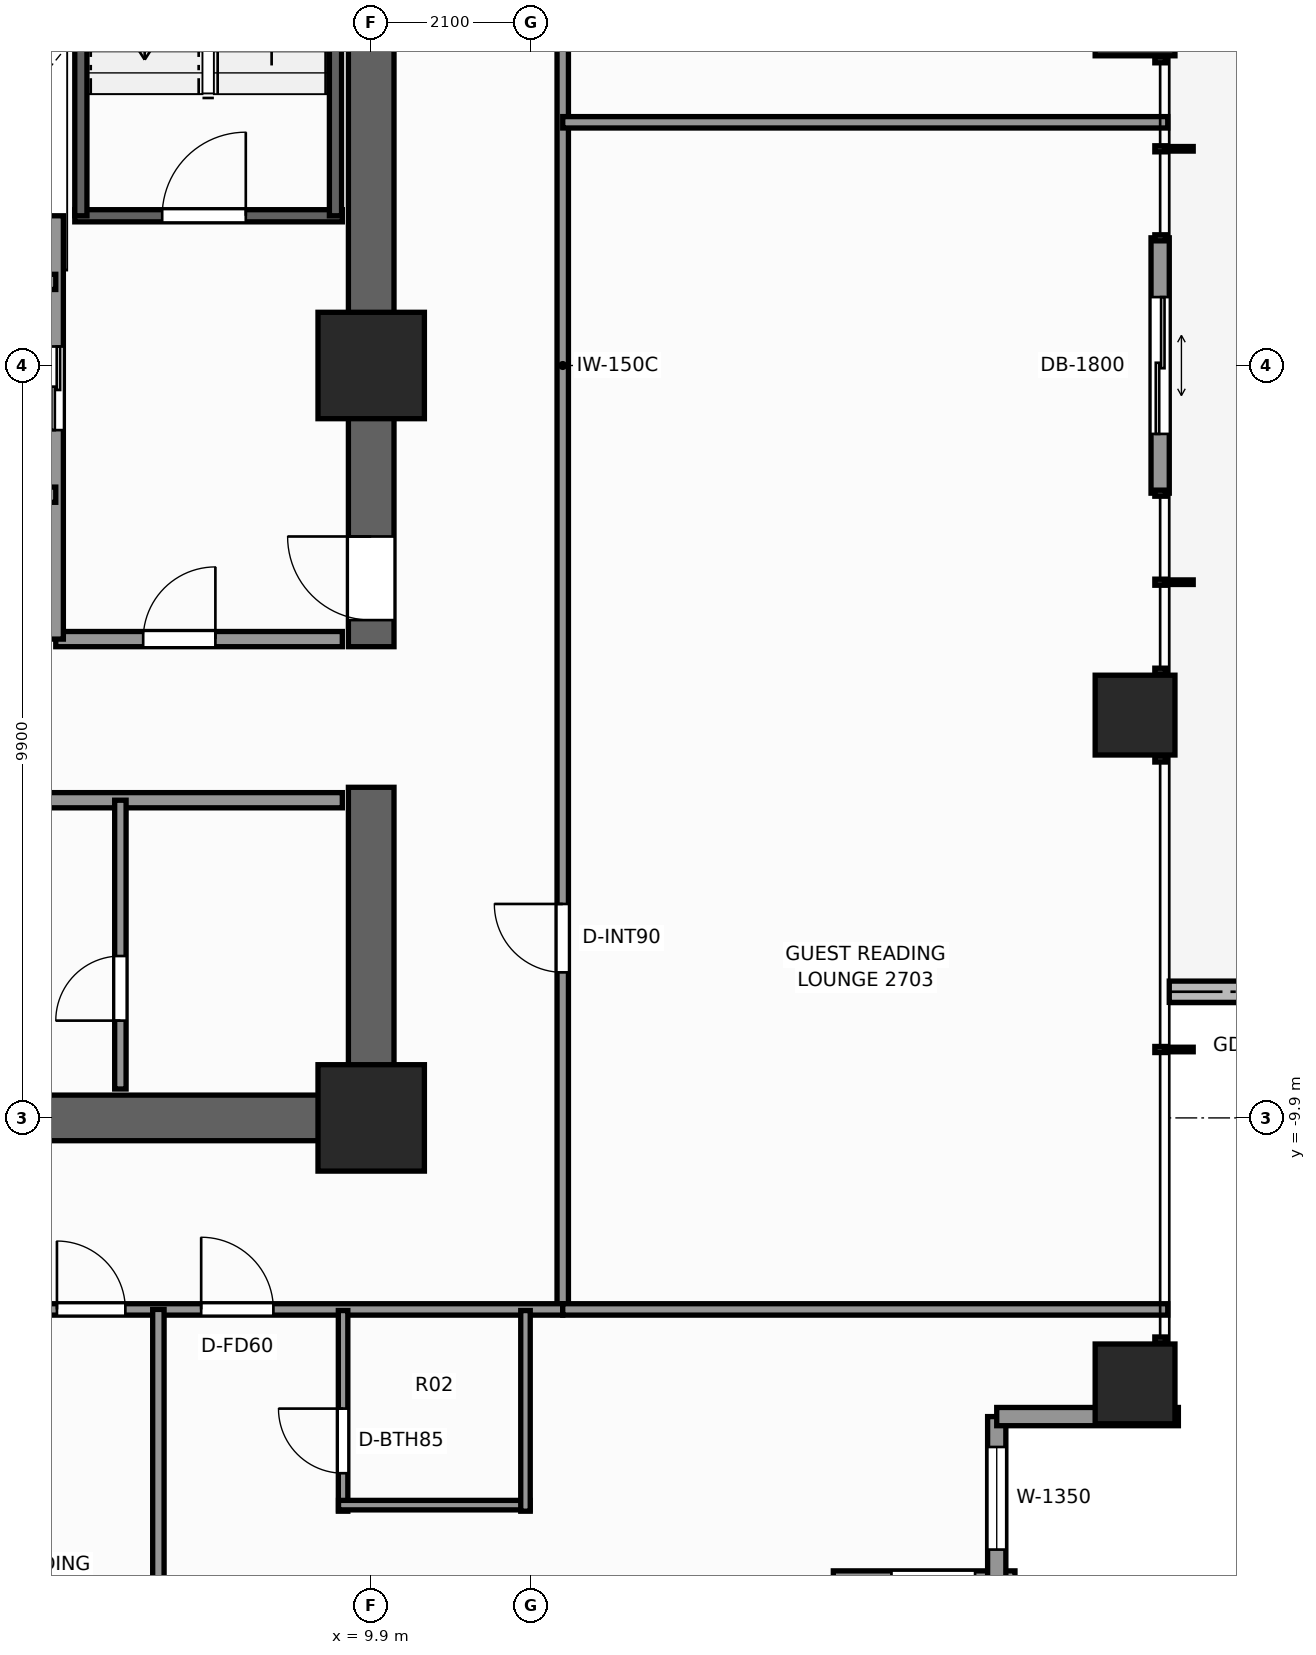
"""IFC4 building model, lengths in metres.
Left out: names, types, materials, properties, quantities, classifications, styles, units other than length and angle.
Written with IfcOpenShell. Run it as: python <this file> out.ifc"""

import sys

from ifc_helpers import new_model, si_unit, direction, frame, frame_2d, origin, origin_2d, place, context, subcontext, project, spatial, rectangle, extrude, element, fill, save


model = new_model("IFC4")
c1 = context("Model", 3, precision=1e-05, world=origin(), true_north=direction((0.0, 1.0)))
c2 = subcontext(c1, "Body", "Model", "MODEL_VIEW")
j1 = project(units=[si_unit("LENGTHUNIT", "METRE"), si_unit("PLANEANGLEUNIT", "RADIAN")], contexts=[c1])
p1 = place(None, origin())
s1 = spatial("IfcSite", under=j1, at=p1, CompositionType="ELEMENT")
p2 = place(p1, origin())
s2 = spatial("IfcBuilding", under=s1, at=p2, CompositionType="ELEMENT")
p3 = place(p2, frame((0.0, 0.0, 95.3)))
s3 = spatial("IfcBuildingStorey", under=s2, at=p3, CompositionType="ELEMENT", Elevation=95.3)
p4 = place(p3, frame((10.2, -9.9, 0.0), z_axis=(0.0, 0.0, 1.0), x_axis=(-1.0, 0.0, 0.0)))
e1 = element("IfcWall", 1, at=p4, inside=s3, PredefinedType="SHEAR", context=c2, shape_type="SweptSolid", body=[
    extrude(rectangle(XDim=12.06, YDim=0.6, at=frame_2d((6.03, 0.0))), origin(), (0.0, 0.0, 1.0), 3.3),
])
p5 = place(p3, frame((9.9, -9.6, 0.0), z_axis=(0.0, 0.0, 1.0), x_axis=(0.0, 1.0, 0.0)))
e2 = element("IfcWall", 2, at=p5, inside=s3, PredefinedType="SHEAR", context=c2, shape_type="SweptSolid", body=[
    extrude(rectangle(XDim=4.05, YDim=0.6, at=frame_2d((2.025, 0.0))), origin(), (0.0, 0.0, 1.0), 3.3),
])
p6 = place(p3, frame((9.9, -3.7, 0.0), z_axis=(0.0, 0.0, 1.0), x_axis=(0.0, 1.0, 0.0)))
e3 = element("IfcWall", 3, at=p6, inside=s3, PredefinedType="SHEAR", context=c2, shape_type="SweptSolid", body=[
    extrude(rectangle(XDim=13.3, YDim=0.6, at=frame_2d((6.65, 0.0))), origin(), (0.0, 0.0, 1.0), 3.3),
])
p7 = place(p6, frame((0.35, 0.0, 0.0)))
e4 = element("IfcOpeningElement", 4, at=p7, cuts=e3, PredefinedType="OPENING", context=c2, shape_type="SweptSolid", body=[
    extrude(rectangle(XDim=1.1, YDim=2.2, at=frame_2d((0.55, 1.1))), frame((0.0, 0.31, 0.0), z_axis=(0.0, -1.0, 0.0), x_axis=(1.0, 0.0, 0.0)), (0.0, 0.0, 1.0), 0.62),
])
for number, where, z_axis, x_axis in (
    (5, (9.9, -9.9, 0.0), (0.0, 0.0, 1.0), (1.0, 0.0, 0.0)),
    (6, (9.9, 0.0, 0.0), (0.0, 0.0, 1.0), (1.0, 0.0, 0.0)),
):
    element("IfcColumn", number, at=place(p3, frame(where, z_axis=z_axis, x_axis=x_axis)), inside=s3, PredefinedType="COLUMN", context=c2, shape_type="SweptSolid", body=[
        extrude(rectangle(XDim=1.4, YDim=1.4, at=origin_2d()), origin(), (0.0, 0.0, 1.0), 3.3),
    ])
for number, where, z_axis, x_axis in (
    (7, (19.95, -13.4, 0.0), (0.0, 0.0, 1.0), (1.0, 0.0, 0.0)),
    (8, (19.95, -4.6, 0.0), (0.0, 0.0, 1.0), (1.0, 0.0, 0.0)),
    (9, (19.95, 4.6, 0.0), (0.0, 0.0, 1.0), (1.0, 0.0, 0.0)),
):
    element("IfcColumn", number, at=place(p3, frame(where, z_axis=z_axis, x_axis=x_axis)), inside=s3, PredefinedType="COLUMN", context=c2, shape_type="SweptSolid", body=[
        extrude(rectangle(XDim=1.05, YDim=1.05, at=origin_2d()), origin(), (0.0, 0.0, 1.0), 3.3),
    ])
p8 = place(p3, frame((20.4, -8.24, -0.04), z_axis=(0.0, 0.0, 1.0), x_axis=(1.0, 0.0, 0.0)))
e10 = element("IfcWall", 10, at=p8, inside=s3, PredefinedType="PARAPET", context=c2, shape_type="SweptSolid", body=[
    extrude(rectangle(XDim=2.34, YDim=0.28, at=frame_2d((1.17, 0.0))), origin(), (0.0, 0.0, 1.0), 0.42),
])
p9 = place(p3, frame((18.37, -15.98, 0.0), z_axis=(0.0, 0.0, 1.0), x_axis=(-1.0, 0.0, 0.0)))
e11 = element("IfcWall", 11, at=p9, inside=s3, PredefinedType="STANDARD", context=c2, shape_type="SweptSolid", body=[
    extrude(rectangle(XDim=2.39, YDim=0.24, at=frame_2d((1.195, 0.0))), origin(), (0.0, 0.0, 1.0), 2.459),
])
p10 = place(p9, frame((0.525, 0.0, 0.65)))
e12 = element("IfcOpeningElement", 12, at=p10, cuts=e11, PredefinedType="OPENING", context=c2, shape_type="SweptSolid", body=[
    extrude(rectangle(XDim=1.1, YDim=1.45, at=frame_2d((0.55, 0.725))), frame((0.0, 0.13, 0.0), z_axis=(0.0, -1.0, 0.0), x_axis=(1.0, 0.0, 0.0)), (0.0, 0.0, 1.0), 0.26),
])
p11 = place(p3, frame((18.13, -13.83, 0.0), z_axis=(0.0, 0.0, 1.0), x_axis=(0.0, -1.0, 0.0)))
e13 = element("IfcWall", 13, at=p11, inside=s3, PredefinedType="STANDARD", context=c2, shape_type="SweptSolid", body=[
    extrude(rectangle(XDim=2.39, YDim=0.24, at=frame_2d((1.195, 0.0))), origin(), (0.0, 0.0, 1.0), 2.459),
])
p12 = place(p11, frame((0.4, 0.0, 0.65)))
e14 = element("IfcOpeningElement", 14, at=p12, cuts=e13, PredefinedType="OPENING", context=c2, shape_type="SweptSolid", body=[
    extrude(rectangle(XDim=1.35, YDim=1.55, at=frame_2d((0.675, 0.775))), frame((0.0, 0.13, 0.0), z_axis=(0.0, -1.0, 0.0), x_axis=(1.0, 0.0, 0.0)), (0.0, 0.0, 1.0), 0.26),
])
p13 = place(p3, frame((20.52, -13.83, 0.0), z_axis=(0.0, 0.0, 1.0), x_axis=(-1.0, 0.0, 0.0)))
e15 = element("IfcWall", 15, at=p13, inside=s3, PredefinedType="STANDARD", context=c2, shape_type="SweptSolid", body=[
    extrude(rectangle(XDim=2.39, YDim=0.24, at=frame_2d((1.195, 0.0))), origin(), (0.0, 0.0, 1.0), 2.459),
])
p14 = place(p3, frame((20.28, 1.68, 0.0), z_axis=(0.0, 0.0, 1.0), x_axis=(0.0, -1.0, 0.0)))
e16 = element("IfcWall", 16, at=p14, inside=s3, PredefinedType="STANDARD", context=c2, shape_type="SweptSolid", body=[
    extrude(rectangle(XDim=3.36, YDim=0.24, at=frame_2d((1.68, 0.0))), origin(), (0.0, 0.0, 1.0), 3.08),
])
p15 = place(p14, frame((0.78, 0.0, 0.0)))
e17 = element("IfcOpeningElement", 17, at=p15, cuts=e16, PredefinedType="OPENING", context=c2, shape_type="SweptSolid", body=[
    extrude(rectangle(XDim=1.8, YDim=2.2, at=frame_2d((0.9, 1.1))), frame((0.0, 0.13, 0.0), z_axis=(0.0, -1.0, 0.0), x_axis=(1.0, 0.0, 0.0)), (0.0, 0.0, 1.0), 0.26),
])
p16 = place(p3, frame((6.0, 1.97, 0.0), z_axis=(0.0, 0.0, 1.0), x_axis=(1.0, 0.0, 0.0)))
e18 = element("IfcWall", 18, at=p16, inside=s3, PredefinedType="SHEAR", context=c2, shape_type="SweptSolid", body=[
    extrude(rectangle(XDim=3.52, YDim=0.16, at=frame_2d((1.76, 0.0))), origin(), (0.0, 0.0, 1.0), 3.3),
])
p17 = place(p16, frame((1.15, 0.0, 0.0)))
e19 = element("IfcOpeningElement", 19, at=p17, cuts=e18, PredefinedType="OPENING", context=c2, shape_type="SweptSolid", body=[
    extrude(rectangle(XDim=1.1, YDim=2.2, at=frame_2d((0.55, 1.1))), frame((0.0, 0.09, 0.0), z_axis=(0.0, -1.0, 0.0), x_axis=(1.0, 0.0, 0.0)), (0.0, 0.0, 1.0), 0.18),
])
for number, where, z_axis, x_axis in (
    (20, (6.08, 1.97, 0.0), (0.0, 0.0, 1.0), (0.0, 1.0, 0.0)),
    (21, (9.43, 1.97, 0.0), (0.0, 0.0, 1.0), (0.0, 1.0, 0.0)),
):
    element("IfcWall", number, at=place(p3, frame(where, z_axis=z_axis, x_axis=x_axis)), inside=s3, PredefinedType="SHEAR", context=c2, shape_type="SweptSolid", body=[
        extrude(rectangle(XDim=7.56, YDim=0.16, at=frame_2d((3.78, 0.0))), origin(), (0.0, 0.0, 1.0), 3.3),
    ])
p18 = place(p3, frame((5.75, -3.6, 0.0), z_axis=(0.0, 0.0, 1.0), x_axis=(1.0, 0.0, 0.0)))
e22 = element("IfcWall", 22, at=p18, inside=s3, PredefinedType="SOLIDWALL", context=c2, shape_type="SweptSolid", body=[
    extrude(rectangle(XDim=3.77, YDim=0.2, at=frame_2d((1.885, 0.0))), origin(), (0.0, 0.0, 1.0), 3.08),
])
p19 = place(p18, frame((1.15, 0.0, 0.0)))
e23 = element("IfcOpeningElement", 23, at=p19, cuts=e22, PredefinedType="OPENING", context=c2, shape_type="SweptSolid", body=[
    extrude(rectangle(XDim=0.95, YDim=2.06, at=frame_2d((0.475, 1.03))), frame((0.0, 0.11, 0.0), z_axis=(0.0, -1.0, 0.0), x_axis=(1.0, 0.0, 0.0)), (0.0, 0.0, 1.0), 0.22),
])
p20 = place(p3, frame((5.75, -3.6, 0.0), z_axis=(0.0, 0.0, 1.0), x_axis=(0.0, 1.0, 0.0)))
e24 = element("IfcWall", 24, at=p20, inside=s3, PredefinedType="SOLIDWALL", context=c2, shape_type="SweptSolid", body=[
    extrude(rectangle(XDim=5.57, YDim=0.2, at=frame_2d((2.785, 0.0))), origin(), (0.0, 0.0, 1.0), 3.08),
])
p21 = place(p20, frame((2.75, 0.0, 0.0)))
e25 = element("IfcOpeningElement", 25, at=p21, cuts=e24, PredefinedType="OPENING", context=c2, shape_type="SweptSolid", body=[
    extrude(rectangle(XDim=1.1, YDim=2.2, at=frame_2d((0.55, 1.1))), frame((0.0, 0.11, 0.0), z_axis=(0.0, -1.0, 0.0), x_axis=(1.0, 0.0, 0.0)), (0.0, 0.0, 1.0), 0.22),
])
for number, where, z_axis, x_axis in (
    (26, (3.35, -1.7, 0.0), (0.0, 0.0, 1.0), (1.0, 0.0, 0.0)),
    (27, (3.35, 1.1, 0.0), (0.0, 0.0, 1.0), (1.0, 0.0, 0.0)),
):
    element("IfcWall", number, at=place(p3, frame(where, z_axis=z_axis, x_axis=x_axis)), inside=s3, PredefinedType="SOLIDWALL", context=c2, shape_type="SweptSolid", body=[
        extrude(rectangle(XDim=2.4, YDim=0.2, at=frame_2d((1.2, 0.0))), origin(), (0.0, 0.0, 1.0), 3.08),
    ])
p22 = place(p3, frame((3.86, -5.72, 0.0), z_axis=(0.0, 0.0, 1.0), x_axis=(1.0, 0.0, 0.0)))
e28 = element("IfcWall", 28, at=p22, inside=s3, PredefinedType="SOLIDWALL", context=c2, shape_type="SweptSolid", body=[
    extrude(rectangle(XDim=5.66, YDim=0.2, at=frame_2d((2.83, 0.0))), origin(), (0.0, 0.0, 1.0), 3.08),
])
p23 = place(p22, frame((0.85, 0.0, 0.0)))
e29 = element("IfcOpeningElement", 29, at=p23, cuts=e28, PredefinedType="OPENING", context=c2, shape_type="SweptSolid", body=[
    extrude(rectangle(XDim=0.95, YDim=2.06, at=frame_2d((0.475, 1.03))), frame((0.0, 0.11, 0.0), z_axis=(0.0, -1.0, 0.0), x_axis=(1.0, 0.0, 0.0)), (0.0, 0.0, 1.0), 0.22),
])
p24 = place(p3, frame((6.6, -9.52, 0.0), z_axis=(0.0, 0.0, 1.0), x_axis=(0.0, 1.0, 0.0)))
e30 = element("IfcWall", 30, at=p24, inside=s3, PredefinedType="PARTITIONING", context=c2, shape_type="SweptSolid", body=[
    extrude(rectangle(XDim=3.8, YDim=0.15, at=frame_2d((1.9, 0.0))), origin(), (0.0, 0.0, 1.0), 3.08),
])
p25 = place(p24, frame((0.9, 0.0, 0.0)))
e31 = element("IfcOpeningElement", 31, at=p25, cuts=e30, PredefinedType="OPENING", context=c2, shape_type="SweptSolid", body=[
    extrude(rectangle(XDim=0.85, YDim=2.03, at=frame_2d((0.425, 1.015))), frame((0.0, 0.085, 0.0), z_axis=(0.0, -1.0, 0.0), x_axis=(1.0, 0.0, 0.0)), (0.0, 0.0, 1.0), 0.17),
])
p26 = place(p3, frame((12.42, -12.42, 0.0), z_axis=(0.0, 0.0, 1.0), x_axis=(0.0, 1.0, 0.0)))
e32 = element("IfcWall", 32, at=p26, inside=s3, PredefinedType="PARTITIONING", context=c2, shape_type="SweptSolid", body=[
    extrude(rectangle(XDim=24.84, YDim=0.15, at=frame_2d((12.42, 0.0))), origin(), (0.0, 0.0, 1.0), 2.292),
])
p27 = place(p26, frame((4.435, 0.0, 0.0)))
e33 = element("IfcOpeningElement", 33, at=p27, cuts=e32, PredefinedType="OPENING", context=c2, shape_type="SweptSolid", body=[
    extrude(rectangle(XDim=0.9, YDim=2.06, at=frame_2d((0.45, 1.03))), frame((0.0, 0.085, 0.0), z_axis=(0.0, -1.0, 0.0), x_axis=(1.0, 0.0, 0.0)), (0.0, 0.0, 1.0), 0.17),
])
p28 = place(p26, frame((19.505, 0.0, 0.0)))
e34 = element("IfcOpeningElement", 34, at=p28, cuts=e32, PredefinedType="OPENING", context=c2, shape_type="SweptSolid", body=[
    extrude(rectangle(XDim=0.9, YDim=2.06, at=frame_2d((0.45, 1.03))), frame((0.0, 0.085, 0.0), z_axis=(0.0, -1.0, 0.0), x_axis=(1.0, 0.0, 0.0)), (0.0, 0.0, 1.0), 0.17),
])
p29 = place(p3, frame((-3.65, -12.42, 0.0), z_axis=(0.0, 0.0, 1.0), x_axis=(1.0, 0.0, 0.0)))
e35 = element("IfcWall", 35, at=p29, inside=s3, PredefinedType="PARTITIONING", context=c2, shape_type="SweptSolid", body=[
    extrude(rectangle(XDim=16.07, YDim=0.15, at=frame_2d((8.035, 0.0))), origin(), (0.0, 0.0, 1.0), 2.292),
])
p30 = place(p29, frame((0.889, 0.0, 0.0)))
e36 = element("IfcOpeningElement", 36, at=p30, cuts=e35, PredefinedType="OPENING", context=c2, shape_type="SweptSolid", body=[
    extrude(rectangle(XDim=0.9, YDim=2.06, at=frame_2d((0.45, 1.03))), frame((0.0, 0.085, 0.0), z_axis=(0.0, -1.0, 0.0), x_axis=(1.0, 0.0, 0.0)), (0.0, 0.0, 1.0), 0.17),
])
p31 = place(p29, frame((4.722, 0.0, 0.0)))
e37 = element("IfcOpeningElement", 37, at=p31, cuts=e35, PredefinedType="OPENING", context=c2, shape_type="SweptSolid", body=[
    extrude(rectangle(XDim=0.95, YDim=2.06, at=frame_2d((0.475, 1.03))), frame((0.0, 0.085, 0.0), z_axis=(0.0, -1.0, 0.0), x_axis=(1.0, 0.0, 0.0)), (0.0, 0.0, 1.0), 0.17),
])
p32 = place(p29, frame((9.415, 0.0, 0.0)))
e38 = element("IfcOpeningElement", 38, at=p32, cuts=e35, PredefinedType="OPENING", context=c2, shape_type="SweptSolid", body=[
    extrude(rectangle(XDim=0.9, YDim=2.06, at=frame_2d((0.45, 1.03))), frame((0.0, 0.085, 0.0), z_axis=(0.0, -1.0, 0.0), x_axis=(1.0, 0.0, 0.0)), (0.0, 0.0, 1.0), 0.17),
])
p33 = place(p29, frame((11.313, 0.0, 0.0)))
e39 = element("IfcOpeningElement", 39, at=p33, cuts=e35, PredefinedType="OPENING", context=c2, shape_type="SweptSolid", body=[
    extrude(rectangle(XDim=0.95, YDim=2.06, at=frame_2d((0.475, 1.03))), frame((0.0, 0.085, 0.0), z_axis=(0.0, -1.0, 0.0), x_axis=(1.0, 0.0, 0.0)), (0.0, 0.0, 1.0), 0.17),
])
p34 = place(p3, frame((12.42, -12.42, 0.0), z_axis=(0.0, 0.0, 1.0), x_axis=(1.0, 0.0, 0.0)))
e40 = element("IfcWall", 40, at=p34, inside=s3, PredefinedType="PARTITIONING", context=c2, shape_type="SweptSolid", body=[
    extrude(rectangle(XDim=7.96, YDim=0.15, at=frame_2d((3.98, 0.0))), origin(), (0.0, 0.0, 1.0), 2.292),
])
for number, where, z_axis, x_axis in (
    (41, (12.42, 3.2, 0.0), (0.0, 0.0, 1.0), (1.0, 0.0, 0.0)),
    (42, (7.1, -20.38, 0.0), (0.0, 0.0, 1.0), (0.0, 1.0, 0.0)),
):
    element("IfcWall", number, at=place(p3, frame(where, z_axis=z_axis, x_axis=x_axis)), inside=s3, PredefinedType="PARTITIONING", context=c2, shape_type="SweptSolid", body=[
        extrude(rectangle(XDim=7.96, YDim=0.15, at=frame_2d((3.98, 0.0))), origin(), (0.0, 0.0, 1.0), 2.449),
    ])
p35 = place(p3, frame((9.53, -15.075, 0.0), z_axis=(0.0, 0.0, 1.0), x_axis=(0.0, 1.0, 0.0)))
e43 = element("IfcWall", 43, at=p35, inside=s3, PredefinedType="PARTITIONING", context=c2, shape_type="SweptSolid", body=[
    extrude(rectangle(XDim=2.64, YDim=0.125, at=frame_2d((1.32, 0.0))), origin(), (0.0, 0.0, 1.0), 3.08),
])
p36 = place(p35, frame((0.5, 0.0, 0.0)))
e44 = element("IfcOpeningElement", 44, at=p36, cuts=e43, PredefinedType="OPENING", context=c2, shape_type="SweptSolid", body=[
    extrude(rectangle(XDim=0.85, YDim=2.03, at=frame_2d((0.425, 1.015))), frame((0.0, 0.073, 0.0), z_axis=(0.0, -1.0, 0.0), x_axis=(1.0, 0.0, 0.0)), (0.0, 0.0, 1.0), 0.145),
])
p37 = place(p3, frame((9.47, -14.995, 0.0), z_axis=(0.0, 0.0, 1.0), x_axis=(1.0, 0.0, 0.0)))
e45 = element("IfcWall", 45, at=p37, inside=s3, PredefinedType="PARTITIONING", context=c2, shape_type="SweptSolid", body=[
    extrude(rectangle(XDim=2.52, YDim=0.125, at=frame_2d((1.26, 0.0))), origin(), (0.0, 0.0, 1.0), 2.292),
])
p38 = place(p3, frame((11.93, -15.075, 0.0), z_axis=(0.0, 0.0, 1.0), x_axis=(0.0, 1.0, 0.0)))
e46 = element("IfcWall", 46, at=p38, inside=s3, PredefinedType="PARTITIONING", context=c2, shape_type="SweptSolid", body=[
    extrude(rectangle(XDim=2.64, YDim=0.125, at=frame_2d((1.32, 0.0))), origin(), (0.0, 0.0, 1.0), 2.292),
])
p39 = place(p12, origin())
e47 = element("IfcWindow", 47, at=p39, inside=s3, PartitioningType="SINGLE_PANEL", PredefinedType="WINDOW", context=c2, shape_type="SweptSolid", body=[
    extrude(rectangle(XDim=1.35, YDim=1.55, at=frame_2d((0.675, 0.775))), frame((0.0, 0.03, 0.0), z_axis=(0.0, -1.0, 0.0), x_axis=(1.0, 0.0, 0.0)), (0.0, 0.0, 1.0), 0.06),
])
fill(e14, e47)
p40 = place(p15, origin())
e48 = element("IfcDoor", 48, at=p40, inside=s3, OperationType="DOUBLE_DOOR_SLIDING", PredefinedType="DOOR", context=c2, shape_type="SweptSolid", body=[
    extrude(rectangle(XDim=1.8, YDim=2.2, at=frame_2d((0.9, 1.1))), frame((0.0, 0.025, 0.0), z_axis=(0.0, -1.0, 0.0), x_axis=(1.0, 0.0, 0.0)), (0.0, 0.0, 1.0), 0.05),
])
fill(e17, e48)
p41 = place(p17, origin())
e49 = element("IfcDoor", 49, at=p41, inside=s3, OperationType="SINGLE_SWING_RIGHT", PredefinedType="DOOR", context=c2, shape_type="SweptSolid", body=[
    extrude(rectangle(XDim=1.1, YDim=2.2, at=frame_2d((0.55, 1.1))), frame((0.0, 0.025, 0.0), z_axis=(0.0, -1.0, 0.0), x_axis=(1.0, 0.0, 0.0)), (0.0, 0.0, 1.0), 0.05),
])
fill(e19, e49)
p42 = place(p7, origin())
e50 = element("IfcDoor", 50, at=p42, inside=s3, OperationType="SINGLE_SWING_RIGHT", PredefinedType="DOOR", context=c2, shape_type="SweptSolid", body=[
    extrude(rectangle(XDim=1.1, YDim=2.2, at=frame_2d((0.55, 1.1))), frame((0.0, 0.025, 0.0), z_axis=(0.0, -1.0, 0.0), x_axis=(1.0, 0.0, 0.0)), (0.0, 0.0, 1.0), 0.05),
])
fill(e4, e50)
p43 = place(p21, origin())
e51 = element("IfcDoor", 51, at=p43, inside=s3, OperationType="DOUBLE_DOOR_SLIDING", PredefinedType="DOOR", context=c2, shape_type="SweptSolid", body=[
    extrude(rectangle(XDim=1.1, YDim=2.2, at=frame_2d((0.55, 1.1))), frame((0.0, 0.025, 0.0), z_axis=(0.0, -1.0, 0.0), x_axis=(1.0, 0.0, 0.0)), (0.0, 0.0, 1.0), 0.05),
])
fill(e25, e51)
p44 = place(p25, origin())
e52 = element("IfcDoor", 52, at=p44, inside=s3, OperationType="SINGLE_SWING_LEFT", PredefinedType="DOOR", context=c2, shape_type="SweptSolid", body=[
    extrude(rectangle(XDim=0.85, YDim=2.03, at=frame_2d((0.425, 1.015))), frame((0.0, 0.025, 0.0), z_axis=(0.0, -1.0, 0.0), x_axis=(1.0, 0.0, 0.0)), (0.0, 0.0, 1.0), 0.05),
])
fill(e31, e52)
p45 = place(p19, origin())
e53 = element("IfcDoor", 53, at=p45, inside=s3, OperationType="SINGLE_SWING_RIGHT", PredefinedType="DOOR", context=c2, shape_type="SweptSolid", body=[
    extrude(rectangle(XDim=0.95, YDim=2.06, at=frame_2d((0.475, 1.03))), frame((0.0, 0.025, 0.0), z_axis=(0.0, -1.0, 0.0), x_axis=(1.0, 0.0, 0.0)), (0.0, 0.0, 1.0), 0.05),
])
fill(e23, e53)
p46 = place(p27, origin())
e54 = element("IfcDoor", 54, at=p46, inside=s3, OperationType="SINGLE_SWING_RIGHT", PredefinedType="DOOR", context=c2, shape_type="SweptSolid", body=[
    extrude(rectangle(XDim=0.9, YDim=2.06, at=frame_2d((0.45, 1.03))), frame((0.0, 0.025, 0.0), z_axis=(0.0, -1.0, 0.0), x_axis=(1.0, 0.0, 0.0)), (0.0, 0.0, 1.0), 0.05),
])
fill(e33, e54)
p47 = place(p32, origin())
e55 = element("IfcDoor", 55, at=p47, inside=s3, OperationType="SINGLE_SWING_LEFT", PredefinedType="DOOR", context=c2, shape_type="SweptSolid", body=[
    extrude(rectangle(XDim=0.9, YDim=2.06, at=frame_2d((0.45, 1.03))), frame((0.0, 0.025, 0.0), z_axis=(0.0, -1.0, 0.0), x_axis=(1.0, 0.0, 0.0)), (0.0, 0.0, 1.0), 0.05),
])
fill(e38, e55)
p48 = place(p36, origin())
e56 = element("IfcDoor", 56, at=p48, inside=s3, OperationType="SINGLE_SWING_RIGHT", PredefinedType="DOOR", context=c2, shape_type="SweptSolid", body=[
    extrude(rectangle(XDim=0.85, YDim=2.03, at=frame_2d((0.425, 1.015))), frame((0.0, 0.025, 0.0), z_axis=(0.0, -1.0, 0.0), x_axis=(1.0, 0.0, 0.0)), (0.0, 0.0, 1.0), 0.05),
])
fill(e44, e56)
p49 = place(p33, origin())
e57 = element("IfcDoor", 57, at=p49, inside=s3, OperationType="SINGLE_SWING_LEFT", PredefinedType="DOOR", context=c2, shape_type="SweptSolid", body=[
    extrude(rectangle(XDim=0.95, YDim=2.06, at=frame_2d((0.475, 1.03))), frame((0.0, 0.025, 0.0), z_axis=(0.0, -1.0, 0.0), x_axis=(1.0, 0.0, 0.0)), (0.0, 0.0, 1.0), 0.05),
])
fill(e39, e57)
save(model, sys.argv[1])
